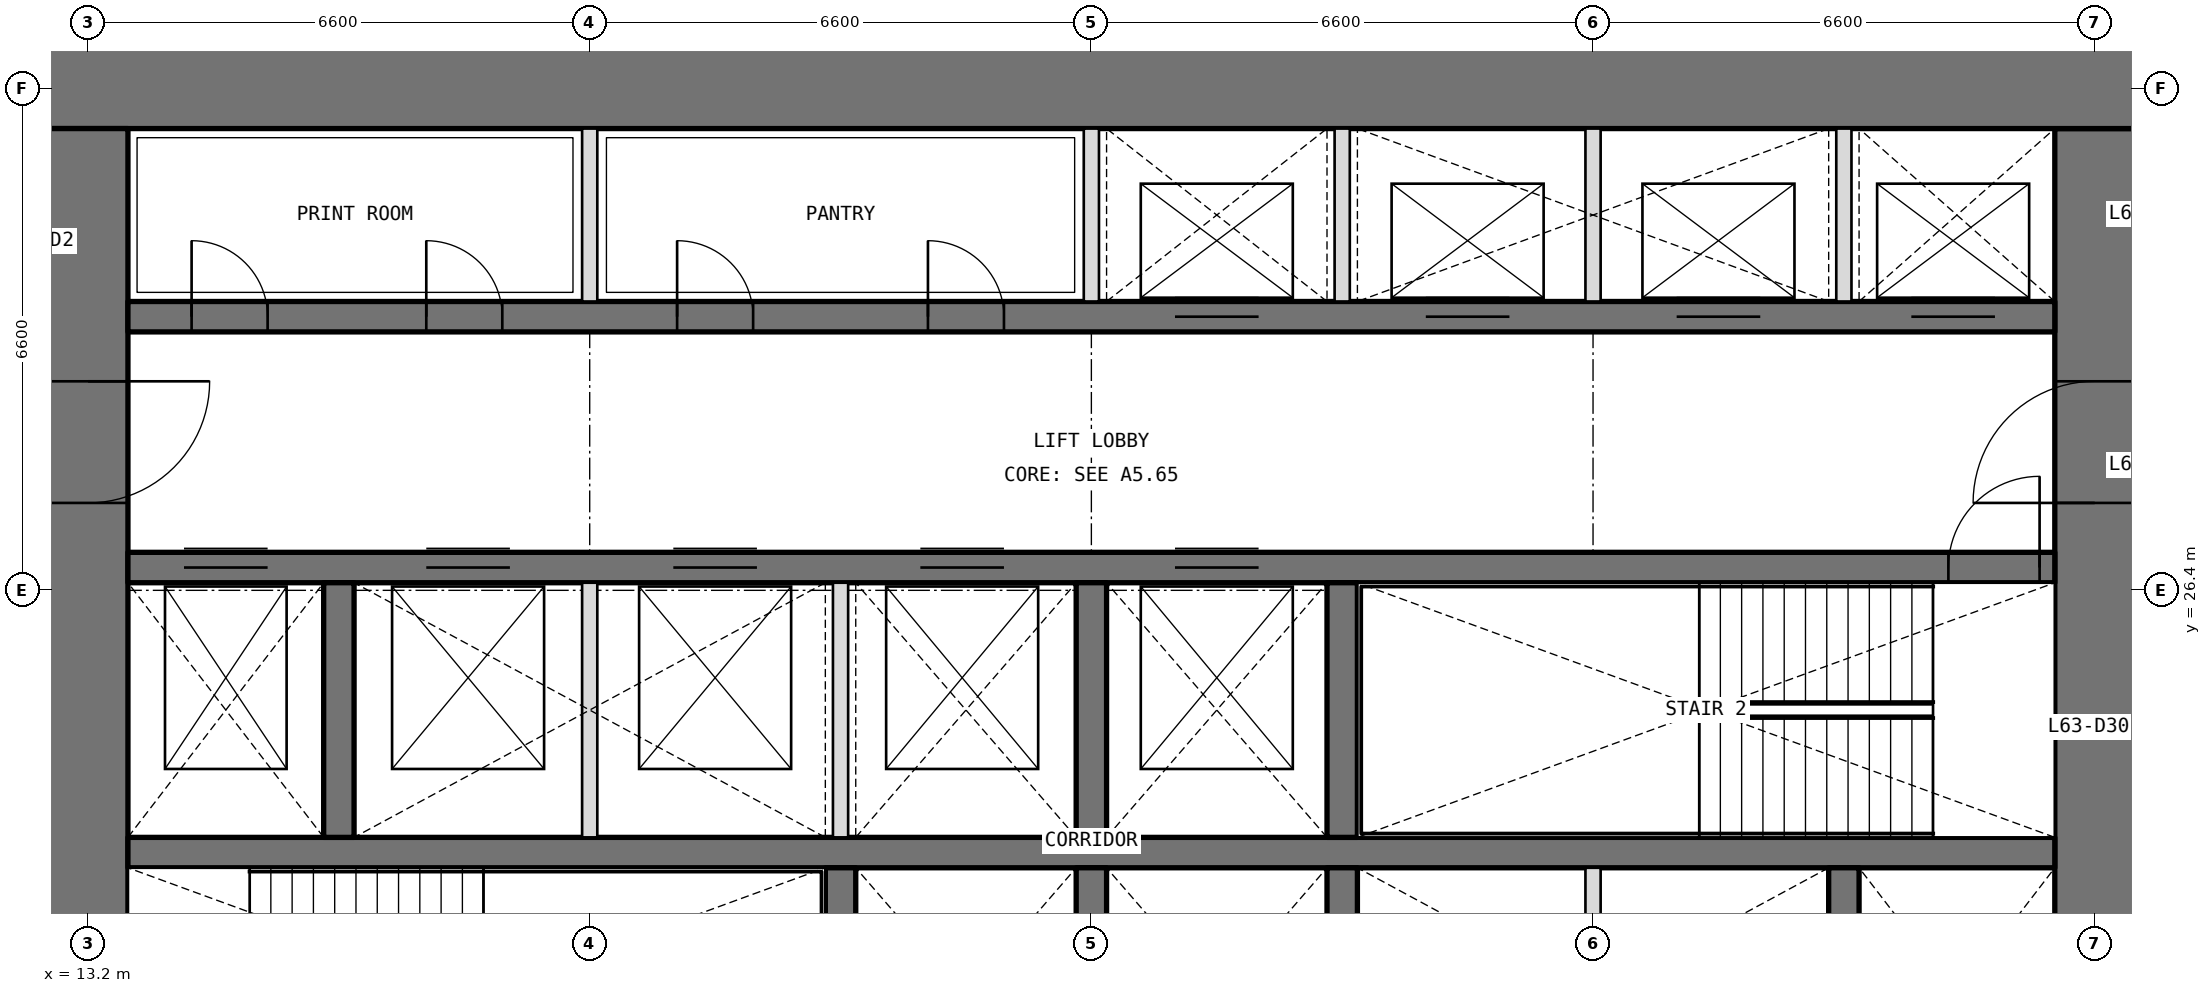
"""IFC4 building model, lengths in metres.
Left out: names, types, materials, properties, quantities, classifications, styles, units other than length and angle.
Written with IfcOpenShell. Run it as: python <this file> out.ifc"""

import sys

from ifc_helpers import new_model, si_unit, direction, frame, frame_2d, origin, place, context, subcontext, project, spatial, rectangle, extrude, element, fill, save


model = new_model("IFC4")
c1 = context("Model", 3, precision=1e-05, world=origin(), true_north=direction((0.0, 1.0)))
c2 = subcontext(c1, "Body", "Model", "MODEL_VIEW")
j1 = project(units=[si_unit("LENGTHUNIT", "METRE"), si_unit("PLANEANGLEUNIT", "RADIAN")], contexts=[c1])
p1 = place(None, origin())
s1 = spatial("IfcSite", under=j1, at=p1, CompositionType="ELEMENT")
p2 = place(p1, origin())
s2 = spatial("IfcBuilding", under=s1, at=p2, CompositionType="ELEMENT")
p3 = place(p2, frame((0.0, 0.0, 275.4)))
s3 = spatial("IfcBuildingStorey", under=s2, at=p3, CompositionType="ELEMENT", Elevation=275.4)
p4 = place(p3, frame((39.6, 13.725, 0.0), z_axis=(0.0, 0.0, 1.0), x_axis=(0.0, 1.0, 0.0)))
e1 = element("IfcWall", 1, at=p4, inside=s3, PredefinedType="SHEAR", context=c2, shape_type="SweptSolid", body=[
    extrude(rectangle(XDim=18.75, YDim=1.05, at=frame_2d((9.375, 0.0))), origin(), (0.0, 0.0, 1.0), 4.2),
])
p5 = place(p4, frame((3.025, 0.0, 0.0)))
e2 = element("IfcOpeningElement", 2, at=p5, cuts=e1, PredefinedType="OPENING", context=c2, shape_type="SweptSolid", body=[
    extrude(rectangle(XDim=1.6, YDim=2.1, at=frame_2d((0.8, 1.05))), frame((0.0, 0.535, 0.0), z_axis=(0.0, -1.0, 0.0), x_axis=(1.0, 0.0, 0.0)), (0.0, 0.0, 1.0), 1.07),
])
p6 = place(p4, frame((13.825, 0.0, 0.0)))
e3 = element("IfcOpeningElement", 3, at=p6, cuts=e1, PredefinedType="OPENING", context=c2, shape_type="SweptSolid", body=[
    extrude(rectangle(XDim=1.6, YDim=2.1, at=frame_2d((0.8, 1.05))), frame((0.0, 0.535, 0.0), z_axis=(0.0, -1.0, 0.0), x_axis=(1.0, 0.0, 0.0)), (0.0, 0.0, 1.0), 1.07),
])
p7 = place(p3, frame((40.125, 33.0, 0.0), z_axis=(0.0, 0.0, 1.0), x_axis=(-1.0, 0.0, 0.0)))
e4 = element("IfcWall", 4, at=p7, inside=s3, PredefinedType="SHEAR", context=c2, shape_type="SweptSolid", body=[
    extrude(rectangle(XDim=27.45, YDim=1.05, at=frame_2d((13.725, 0.0))), origin(), (0.0, 0.0, 1.0), 4.2),
])
p8 = place(p3, frame((13.2, 32.475, 0.0), z_axis=(0.0, 0.0, 1.0), x_axis=(0.0, -1.0, 0.0)))
e5 = element("IfcWall", 5, at=p8, inside=s3, PredefinedType="SHEAR", context=c2, shape_type="SweptSolid", body=[
    extrude(rectangle(XDim=18.75, YDim=1.05, at=frame_2d((9.375, 0.0))), origin(), (0.0, 0.0, 1.0), 4.2),
])
p9 = place(p8, frame((14.125, 0.0, 0.0)))
e6 = element("IfcOpeningElement", 6, at=p9, cuts=e5, PredefinedType="OPENING", context=c2, shape_type="SweptSolid", body=[
    extrude(rectangle(XDim=1.6, YDim=2.1, at=frame_2d((0.8, 1.05))), frame((0.0, 0.535, 0.0), z_axis=(0.0, -1.0, 0.0), x_axis=(1.0, 0.0, 0.0)), (0.0, 0.0, 1.0), 1.07),
])
p10 = place(p8, frame((3.325, 0.0, 0.0)))
e7 = element("IfcOpeningElement", 7, at=p10, cuts=e5, PredefinedType="OPENING", context=c2, shape_type="SweptSolid", body=[
    extrude(rectangle(XDim=1.6, YDim=2.1, at=frame_2d((0.8, 1.05))), frame((0.0, 0.535, 0.0), z_axis=(0.0, -1.0, 0.0), x_axis=(1.0, 0.0, 0.0)), (0.0, 0.0, 1.0), 1.07),
])
p11 = place(p3, frame((13.725, 22.95, 0.0), z_axis=(0.0, 0.0, 1.0), x_axis=(1.0, 0.0, 0.0)))
e8 = element("IfcWall", 8, at=p11, inside=s3, PredefinedType="SHEAR", context=c2, shape_type="SweptSolid", body=[
    extrude(rectangle(XDim=25.35, YDim=0.4, at=frame_2d((12.675, 0.0))), origin(), (0.0, 0.0, 1.0), 4.2),
])
p12 = place(p3, frame((13.725, 26.7, 0.0), z_axis=(0.0, 0.0, 1.0), x_axis=(1.0, 0.0, 0.0)))
e9 = element("IfcWall", 9, at=p12, inside=s3, PredefinedType="SHEAR", context=c2, shape_type="SweptSolid", body=[
    extrude(rectangle(XDim=25.35, YDim=0.4, at=frame_2d((12.675, 0.0))), origin(), (0.0, 0.0, 1.0), 4.2),
])
p13 = place(p12, frame((23.95, 0.0, 0.0)))
e10 = element("IfcOpeningElement", 10, at=p13, cuts=e9, PredefinedType="OPENING", context=c2, shape_type="SweptSolid", body=[
    extrude(rectangle(XDim=1.2, YDim=2.1, at=frame_2d((0.6, 1.05))), frame((0.0, 0.21, 0.0), z_axis=(0.0, -1.0, 0.0), x_axis=(1.0, 0.0, 0.0)), (0.0, 0.0, 1.0), 0.42),
])
p14 = place(p12, frame((0.738, 0.0, 0.0)))
e11 = element("IfcOpeningElement", 11, at=p14, cuts=e9, PredefinedType="OPENING", context=c2, shape_type="SweptSolid", body=[
    extrude(rectangle(XDim=1.1, YDim=2.1, at=frame_2d((0.55, 1.05))), frame((0.0, 0.21, 0.0), z_axis=(0.0, -1.0, 0.0), x_axis=(1.0, 0.0, 0.0)), (0.0, 0.0, 1.0), 0.42),
])
p15 = place(p12, frame((3.925, 0.0, 0.0)))
e12 = element("IfcOpeningElement", 12, at=p15, cuts=e9, PredefinedType="OPENING", context=c2, shape_type="SweptSolid", body=[
    extrude(rectangle(XDim=1.1, YDim=2.1, at=frame_2d((0.55, 1.05))), frame((0.0, 0.21, 0.0), z_axis=(0.0, -1.0, 0.0), x_axis=(1.0, 0.0, 0.0)), (0.0, 0.0, 1.0), 0.42),
])
p16 = place(p12, frame((7.175, 0.0, 0.0)))
e13 = element("IfcOpeningElement", 13, at=p16, cuts=e9, PredefinedType="OPENING", context=c2, shape_type="SweptSolid", body=[
    extrude(rectangle(XDim=1.1, YDim=2.1, at=frame_2d((0.55, 1.05))), frame((0.0, 0.21, 0.0), z_axis=(0.0, -1.0, 0.0), x_axis=(1.0, 0.0, 0.0)), (0.0, 0.0, 1.0), 0.42),
])
p17 = place(p12, frame((10.425, 0.0, 0.0)))
e14 = element("IfcOpeningElement", 14, at=p17, cuts=e9, PredefinedType="OPENING", context=c2, shape_type="SweptSolid", body=[
    extrude(rectangle(XDim=1.1, YDim=2.1, at=frame_2d((0.55, 1.05))), frame((0.0, 0.21, 0.0), z_axis=(0.0, -1.0, 0.0), x_axis=(1.0, 0.0, 0.0)), (0.0, 0.0, 1.0), 0.42),
])
p18 = place(p12, frame((13.775, 0.0, 0.0)))
e15 = element("IfcOpeningElement", 15, at=p18, cuts=e9, PredefinedType="OPENING", context=c2, shape_type="SweptSolid", body=[
    extrude(rectangle(XDim=1.1, YDim=2.1, at=frame_2d((0.55, 1.05))), frame((0.0, 0.21, 0.0), z_axis=(0.0, -1.0, 0.0), x_axis=(1.0, 0.0, 0.0)), (0.0, 0.0, 1.0), 0.42),
])
p19 = place(p3, frame((13.725, 30.0, 0.0), z_axis=(0.0, 0.0, 1.0), x_axis=(1.0, 0.0, 0.0)))
e16 = element("IfcWall", 16, at=p19, inside=s3, PredefinedType="SHEAR", context=c2, shape_type="SweptSolid", body=[
    extrude(rectangle(XDim=25.35, YDim=0.4, at=frame_2d((12.675, 0.0))), origin(), (0.0, 0.0, 1.0), 4.2),
])
p20 = place(p19, frame((0.837, 0.0, 0.0)))
e17 = element("IfcOpeningElement", 17, at=p20, cuts=e16, PredefinedType="OPENING", context=c2, shape_type="SweptSolid", body=[
    extrude(rectangle(XDim=1.0, YDim=2.1, at=frame_2d((0.5, 1.05))), frame((0.0, 0.21, 0.0), z_axis=(0.0, -1.0, 0.0), x_axis=(1.0, 0.0, 0.0)), (0.0, 0.0, 1.0), 0.42),
])
p21 = place(p19, frame((3.925, 0.0, 0.0)))
e18 = element("IfcOpeningElement", 18, at=p21, cuts=e16, PredefinedType="OPENING", context=c2, shape_type="SweptSolid", body=[
    extrude(rectangle(XDim=1.0, YDim=2.1, at=frame_2d((0.5, 1.05))), frame((0.0, 0.21, 0.0), z_axis=(0.0, -1.0, 0.0), x_axis=(1.0, 0.0, 0.0)), (0.0, 0.0, 1.0), 0.42),
])
p22 = place(p19, frame((7.225, 0.0, 0.0)))
e19 = element("IfcOpeningElement", 19, at=p22, cuts=e16, PredefinedType="OPENING", context=c2, shape_type="SweptSolid", body=[
    extrude(rectangle(XDim=1.0, YDim=2.1, at=frame_2d((0.5, 1.05))), frame((0.0, 0.21, 0.0), z_axis=(0.0, -1.0, 0.0), x_axis=(1.0, 0.0, 0.0)), (0.0, 0.0, 1.0), 0.42),
])
p23 = place(p19, frame((10.525, 0.0, 0.0)))
e20 = element("IfcOpeningElement", 20, at=p23, cuts=e16, PredefinedType="OPENING", context=c2, shape_type="SweptSolid", body=[
    extrude(rectangle(XDim=1.0, YDim=2.1, at=frame_2d((0.5, 1.05))), frame((0.0, 0.21, 0.0), z_axis=(0.0, -1.0, 0.0), x_axis=(1.0, 0.0, 0.0)), (0.0, 0.0, 1.0), 0.42),
])
p24 = place(p19, frame((13.775, 0.0, 0.0)))
e21 = element("IfcOpeningElement", 21, at=p24, cuts=e16, PredefinedType="OPENING", context=c2, shape_type="SweptSolid", body=[
    extrude(rectangle(XDim=1.1, YDim=2.1, at=frame_2d((0.55, 1.05))), frame((0.0, 0.21, 0.0), z_axis=(0.0, -1.0, 0.0), x_axis=(1.0, 0.0, 0.0)), (0.0, 0.0, 1.0), 0.42),
])
p25 = place(p19, frame((17.075, 0.0, 0.0)))
e22 = element("IfcOpeningElement", 22, at=p25, cuts=e16, PredefinedType="OPENING", context=c2, shape_type="SweptSolid", body=[
    extrude(rectangle(XDim=1.1, YDim=2.1, at=frame_2d((0.55, 1.05))), frame((0.0, 0.21, 0.0), z_axis=(0.0, -1.0, 0.0), x_axis=(1.0, 0.0, 0.0)), (0.0, 0.0, 1.0), 0.42),
])
p26 = place(p19, frame((20.375, 0.0, 0.0)))
e23 = element("IfcOpeningElement", 23, at=p26, cuts=e16, PredefinedType="OPENING", context=c2, shape_type="SweptSolid", body=[
    extrude(rectangle(XDim=1.1, YDim=2.1, at=frame_2d((0.55, 1.05))), frame((0.0, 0.21, 0.0), z_axis=(0.0, -1.0, 0.0), x_axis=(1.0, 0.0, 0.0)), (0.0, 0.0, 1.0), 0.42),
])
p27 = place(p19, frame((23.462, 0.0, 0.0)))
e24 = element("IfcOpeningElement", 24, at=p27, cuts=e16, PredefinedType="OPENING", context=c2, shape_type="SweptSolid", body=[
    extrude(rectangle(XDim=1.1, YDim=2.1, at=frame_2d((0.55, 1.05))), frame((0.0, 0.21, 0.0), z_axis=(0.0, -1.0, 0.0), x_axis=(1.0, 0.0, 0.0)), (0.0, 0.0, 1.0), 0.42),
])
for number, where, z_axis, x_axis in (
    (25, (23.1, 19.4, 0.0), (0.0, 0.0, 1.0), (0.0, 1.0, 0.0)),
    (26, (26.4, 19.4, 0.0), (0.0, 0.0, 1.0), (0.0, 1.0, 0.0)),
    (27, (29.7, 19.4, 0.0), (0.0, 0.0, 1.0), (0.0, 1.0, 0.0)),
    (28, (36.3, 19.4, 0.0), (0.0, 0.0, 1.0), (0.0, 1.0, 0.0)),
    (29, (16.5, 23.15, 0.0), (0.0, 0.0, 1.0), (0.0, 1.0, 0.0)),
    (30, (26.4, 23.15, 0.0), (0.0, 0.0, 1.0), (0.0, 1.0, 0.0)),
    (31, (29.7, 23.15, 0.0), (0.0, 0.0, 1.0), (0.0, 1.0, 0.0)),
):
    element("IfcWall", number, at=place(p3, frame(where, z_axis=z_axis, x_axis=x_axis)), inside=s3, PredefinedType="SHEAR", context=c2, shape_type="SweptSolid", body=[
        extrude(rectangle(XDim=3.35, YDim=0.4, at=frame_2d((1.675, 0.0))), origin(), (0.0, 0.0, 1.0), 4.2),
    ])
for number, where, z_axis, x_axis in (
    (32, (19.8, 30.2, 0.0), (0.0, 0.0, 1.0), (0.0, 1.0, 0.0)),
    (33, (26.4, 30.2, 0.0), (0.0, 0.0, 1.0), (0.0, 1.0, 0.0)),
    (34, (29.7, 30.2, 0.0), (0.0, 0.0, 1.0), (0.0, 1.0, 0.0)),
    (35, (33.0, 30.2, 0.0), (0.0, 0.0, 1.0), (0.0, 1.0, 0.0)),
    (36, (36.3, 30.2, 0.0), (0.0, 0.0, 1.0), (0.0, 1.0, 0.0)),
):
    element("IfcWall", number, at=place(p3, frame(where, z_axis=z_axis, x_axis=x_axis)), inside=s3, PredefinedType="PARTITIONING", context=c2, shape_type="SweptSolid", body=[
        extrude(rectangle(XDim=2.275, YDim=0.2, at=frame_2d((1.138, 0.0))), origin(), (0.0, 0.0, 1.0), 4.2),
    ])
for number, where, z_axis, x_axis in (
    (37, (33.0, 19.4, 0.0), (0.0, 0.0, 1.0), (0.0, 1.0, 0.0)),
    (38, (19.8, 23.15, 0.0), (0.0, 0.0, 1.0), (0.0, 1.0, 0.0)),
    (39, (23.1, 23.15, 0.0), (0.0, 0.0, 1.0), (0.0, 1.0, 0.0)),
):
    element("IfcWall", number, at=place(p3, frame(where, z_axis=z_axis, x_axis=x_axis)), inside=s3, PredefinedType="PARTITIONING", context=c2, shape_type="SweptSolid", body=[
        extrude(rectangle(XDim=3.35, YDim=0.2, at=frame_2d((1.675, 0.0))), origin(), (0.0, 0.0, 1.0), 4.2),
    ])
p28 = place(p20, origin())
e40 = element("IfcDoor", 40, at=p28, inside=s3, OperationType="SINGLE_SWING_LEFT", PredefinedType="DOOR", context=c2, shape_type="SweptSolid", body=[
    extrude(rectangle(XDim=1.0, YDim=2.1, at=frame_2d((0.5, 1.05))), frame((0.0, 0.025, 0.0), z_axis=(0.0, -1.0, 0.0), x_axis=(1.0, 0.0, 0.0)), (0.0, 0.0, 1.0), 0.05),
])
fill(e17, e40)
p29 = place(p21, origin())
e41 = element("IfcDoor", 41, at=p29, inside=s3, OperationType="SINGLE_SWING_LEFT", PredefinedType="DOOR", context=c2, shape_type="SweptSolid", body=[
    extrude(rectangle(XDim=1.0, YDim=2.1, at=frame_2d((0.5, 1.05))), frame((0.0, 0.025, 0.0), z_axis=(0.0, -1.0, 0.0), x_axis=(1.0, 0.0, 0.0)), (0.0, 0.0, 1.0), 0.05),
])
fill(e18, e41)
p30 = place(p22, origin())
e42 = element("IfcDoor", 42, at=p30, inside=s3, OperationType="SINGLE_SWING_LEFT", PredefinedType="DOOR", context=c2, shape_type="SweptSolid", body=[
    extrude(rectangle(XDim=1.0, YDim=2.1, at=frame_2d((0.5, 1.05))), frame((0.0, 0.025, 0.0), z_axis=(0.0, -1.0, 0.0), x_axis=(1.0, 0.0, 0.0)), (0.0, 0.0, 1.0), 0.05),
])
fill(e19, e42)
p31 = place(p23, origin())
e43 = element("IfcDoor", 43, at=p31, inside=s3, OperationType="SINGLE_SWING_LEFT", PredefinedType="DOOR", context=c2, shape_type="SweptSolid", body=[
    extrude(rectangle(XDim=1.0, YDim=2.1, at=frame_2d((0.5, 1.05))), frame((0.0, 0.025, 0.0), z_axis=(0.0, -1.0, 0.0), x_axis=(1.0, 0.0, 0.0)), (0.0, 0.0, 1.0), 0.05),
])
fill(e20, e43)
p32 = place(p13, origin())
e44 = element("IfcDoor", 44, at=p32, inside=s3, OperationType="SINGLE_SWING_RIGHT", PredefinedType="DOOR", context=c2, shape_type="SweptSolid", body=[
    extrude(rectangle(XDim=1.2, YDim=2.1, at=frame_2d((0.6, 1.05))), frame((0.0, 0.025, 0.0), z_axis=(0.0, -1.0, 0.0), x_axis=(1.0, 0.0, 0.0)), (0.0, 0.0, 1.0), 0.05),
])
fill(e10, e44)
p33 = place(p10, origin())
e45 = element("IfcDoor", 45, at=p33, inside=s3, OperationType="DOUBLE_DOOR_DOUBLE_SWING", PredefinedType="DOOR", context=c2, shape_type="SweptSolid", body=[
    extrude(rectangle(XDim=1.6, YDim=2.1, at=frame_2d((0.8, 1.05))), frame((0.0, 0.025, 0.0), z_axis=(0.0, -1.0, 0.0), x_axis=(1.0, 0.0, 0.0)), (0.0, 0.0, 1.0), 0.05),
])
fill(e7, e45)
p34 = place(p6, origin())
e46 = element("IfcDoor", 46, at=p34, inside=s3, OperationType="DOUBLE_DOOR_DOUBLE_SWING", PredefinedType="DOOR", context=c2, shape_type="SweptSolid", body=[
    extrude(rectangle(XDim=1.6, YDim=2.1, at=frame_2d((0.8, 1.05))), frame((0.0, 0.025, 0.0), z_axis=(0.0, -1.0, 0.0), x_axis=(1.0, 0.0, 0.0)), (0.0, 0.0, 1.0), 0.05),
])
fill(e3, e46)
p35 = place(p24, origin())
e47 = element("IfcDoor", 47, at=p35, inside=s3, OperationType="DOUBLE_DOOR_SLIDING", PredefinedType="DOOR", context=c2, shape_type="SweptSolid", body=[
    extrude(rectangle(XDim=1.1, YDim=2.1, at=frame_2d((0.55, 1.05))), frame((0.0, 0.025, 0.0), z_axis=(0.0, -1.0, 0.0), x_axis=(1.0, 0.0, 0.0)), (0.0, 0.0, 1.0), 0.05),
])
fill(e21, e47)
p36 = place(p25, origin())
e48 = element("IfcDoor", 48, at=p36, inside=s3, OperationType="DOUBLE_DOOR_SLIDING", PredefinedType="DOOR", context=c2, shape_type="SweptSolid", body=[
    extrude(rectangle(XDim=1.1, YDim=2.1, at=frame_2d((0.55, 1.05))), frame((0.0, 0.025, 0.0), z_axis=(0.0, -1.0, 0.0), x_axis=(1.0, 0.0, 0.0)), (0.0, 0.0, 1.0), 0.05),
])
fill(e22, e48)
p37 = place(p26, origin())
e49 = element("IfcDoor", 49, at=p37, inside=s3, OperationType="DOUBLE_DOOR_SLIDING", PredefinedType="DOOR", context=c2, shape_type="SweptSolid", body=[
    extrude(rectangle(XDim=1.1, YDim=2.1, at=frame_2d((0.55, 1.05))), frame((0.0, 0.025, 0.0), z_axis=(0.0, -1.0, 0.0), x_axis=(1.0, 0.0, 0.0)), (0.0, 0.0, 1.0), 0.05),
])
fill(e23, e49)
p38 = place(p27, origin())
e50 = element("IfcDoor", 50, at=p38, inside=s3, OperationType="DOUBLE_DOOR_SLIDING", PredefinedType="DOOR", context=c2, shape_type="SweptSolid", body=[
    extrude(rectangle(XDim=1.1, YDim=2.1, at=frame_2d((0.55, 1.05))), frame((0.0, 0.025, 0.0), z_axis=(0.0, -1.0, 0.0), x_axis=(1.0, 0.0, 0.0)), (0.0, 0.0, 1.0), 0.05),
])
fill(e24, e50)
p39 = place(p14, origin())
e51 = element("IfcDoor", 51, at=p39, inside=s3, OperationType="DOUBLE_DOOR_SLIDING", PredefinedType="DOOR", context=c2, shape_type="SweptSolid", body=[
    extrude(rectangle(XDim=1.1, YDim=2.1, at=frame_2d((0.55, 1.05))), frame((0.0, 0.025, 0.0), z_axis=(0.0, -1.0, 0.0), x_axis=(1.0, 0.0, 0.0)), (0.0, 0.0, 1.0), 0.05),
])
fill(e11, e51)
p40 = place(p15, origin())
e52 = element("IfcDoor", 52, at=p40, inside=s3, OperationType="DOUBLE_DOOR_SLIDING", PredefinedType="DOOR", context=c2, shape_type="SweptSolid", body=[
    extrude(rectangle(XDim=1.1, YDim=2.1, at=frame_2d((0.55, 1.05))), frame((0.0, 0.025, 0.0), z_axis=(0.0, -1.0, 0.0), x_axis=(1.0, 0.0, 0.0)), (0.0, 0.0, 1.0), 0.05),
])
fill(e12, e52)
p41 = place(p16, origin())
e53 = element("IfcDoor", 53, at=p41, inside=s3, OperationType="DOUBLE_DOOR_SLIDING", PredefinedType="DOOR", context=c2, shape_type="SweptSolid", body=[
    extrude(rectangle(XDim=1.1, YDim=2.1, at=frame_2d((0.55, 1.05))), frame((0.0, 0.025, 0.0), z_axis=(0.0, -1.0, 0.0), x_axis=(1.0, 0.0, 0.0)), (0.0, 0.0, 1.0), 0.05),
])
fill(e13, e53)
p42 = place(p17, origin())
e54 = element("IfcDoor", 54, at=p42, inside=s3, OperationType="DOUBLE_DOOR_SLIDING", PredefinedType="DOOR", context=c2, shape_type="SweptSolid", body=[
    extrude(rectangle(XDim=1.1, YDim=2.1, at=frame_2d((0.55, 1.05))), frame((0.0, 0.025, 0.0), z_axis=(0.0, -1.0, 0.0), x_axis=(1.0, 0.0, 0.0)), (0.0, 0.0, 1.0), 0.05),
])
fill(e14, e54)
p43 = place(p18, origin())
e55 = element("IfcDoor", 55, at=p43, inside=s3, OperationType="DOUBLE_DOOR_SLIDING", PredefinedType="DOOR", context=c2, shape_type="SweptSolid", body=[
    extrude(rectangle(XDim=1.1, YDim=2.1, at=frame_2d((0.55, 1.05))), frame((0.0, 0.025, 0.0), z_axis=(0.0, -1.0, 0.0), x_axis=(1.0, 0.0, 0.0)), (0.0, 0.0, 1.0), 0.05),
])
fill(e15, e55)
save(model, sys.argv[1])
